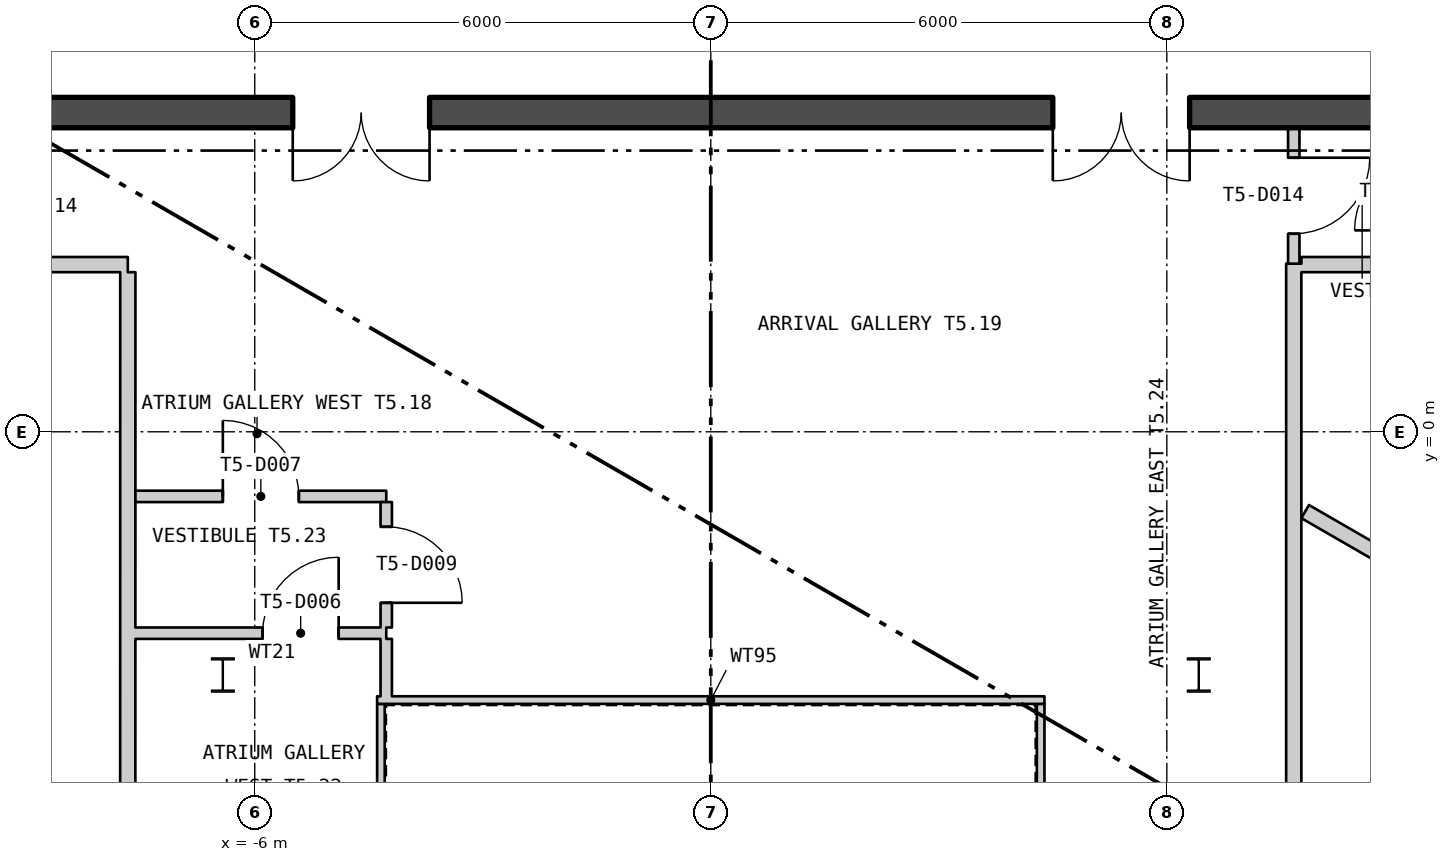
"""IFC4 building model, lengths in metres.
Left out: names, types, materials, properties, quantities, classifications, styles, units other than length and angle.
Written with IfcOpenShell. Run it as: python <this file> out.ifc"""

import sys

from ifc_helpers import new_model, si_unit, direction, frame, frame_2d, origin, origin_2d, place, context, subcontext, project, spatial, polyline, rectangle, i_section, outline, extrude, element, fill, save


model = new_model("IFC4")
c1 = context("Model", 3, precision=1e-05, world=origin(), true_north=direction((0.0, 1.0)))
c2 = subcontext(c1, "Body", "Model", "MODEL_VIEW")
j1 = project(units=[si_unit("LENGTHUNIT", "METRE"), si_unit("PLANEANGLEUNIT", "RADIAN")], contexts=[c1])
p1 = place(None, origin())
s1 = spatial("IfcSite", under=j1, at=p1, CompositionType="ELEMENT")
p2 = place(p1, origin())
s2 = spatial("IfcBuilding", under=s1, at=p2, CompositionType="ELEMENT")
p3 = place(p2, frame((0.0, 0.0, 292.2)))
s3 = spatial("IfcBuildingStorey", under=s2, at=p3, CompositionType="ELEMENT", Elevation=292.2)
for number, where, z_axis, x_axis in (
    (1, (6.42, -3.2, 0.0), (0.0, 0.0, 1.0), (1.0, 0.0, 0.0)),
    (2, (-6.42, -3.2, 0.0), (0.0, 0.0, 1.0), (1.0, 0.0, 0.0)),
):
    element("IfcColumn", number, at=place(p3, frame(where, z_axis=z_axis, x_axis=x_axis)), inside=s3, PredefinedType="COLUMN", context=c2, shape_type="SweptSolid", body=[
        extrude(i_section(OverallWidth=0.3, OverallDepth=0.45, WebThickness=0.014, FlangeThickness=0.026, at=origin_2d()), origin(), (0.0, 0.0, 1.0), 6.0),
    ])
p4 = place(p3, frame((-25.28, 15.792, -0.18), z_axis=(0.0, 0.0, 1.0), x_axis=(0.500000141277, -0.866025322218, 0.0)))
e3 = element("IfcWall", 3, at=p4, inside=s3, PredefinedType="SOLIDWALL", context=c2, shape_type="SweptSolid", body=[
    extrude(outline(polyline([(-0.13, -0.225), (45.86, -0.225), (45.6, 0.225), (0.13, 0.225), (-0.13, -0.225)])), origin(), (0.0, 0.0, 1.0), 5.9),
])
p5 = place(p4, frame((1.424, 0.0, 1.38)))
e4 = element("IfcOpeningElement", 4, at=p5, cuts=e3, PredefinedType="OPENING", context=c2, shape_type="SweptSolid", body=[
    extrude(rectangle(XDim=2.4, YDim=3.6, at=frame_2d((1.2, 1.8))), frame((0.0, 0.235, 0.0), z_axis=(0.0, -1.0, 0.0), x_axis=(1.0, 0.0, 0.0)), (0.0, 0.0, 1.0), 0.47),
])
p6 = place(p4, frame((5.892, 0.0, 1.38)))
e5 = element("IfcOpeningElement", 5, at=p6, cuts=e3, PredefinedType="OPENING", context=c2, shape_type="SweptSolid", body=[
    extrude(rectangle(XDim=2.4, YDim=3.6, at=frame_2d((1.2, 1.8))), frame((0.0, 0.235, 0.0), z_axis=(0.0, -1.0, 0.0), x_axis=(1.0, 0.0, 0.0)), (0.0, 0.0, 1.0), 0.47),
])
p7 = place(p4, frame((10.399, 0.0, 1.38)))
e6 = element("IfcOpeningElement", 6, at=p7, cuts=e3, PredefinedType="OPENING", context=c2, shape_type="SweptSolid", body=[
    extrude(rectangle(XDim=2.4, YDim=3.6, at=frame_2d((1.2, 1.8))), frame((0.0, 0.235, 0.0), z_axis=(0.0, -1.0, 0.0), x_axis=(1.0, 0.0, 0.0)), (0.0, 0.0, 1.0), 0.47),
])
p8 = place(p4, frame((14.905, 0.0, 1.38)))
e7 = element("IfcOpeningElement", 7, at=p8, cuts=e3, PredefinedType="OPENING", context=c2, shape_type="SweptSolid", body=[
    extrude(rectangle(XDim=2.4, YDim=3.6, at=frame_2d((1.2, 1.8))), frame((0.0, 0.235, 0.0), z_axis=(0.0, -1.0, 0.0), x_axis=(1.0, 0.0, 0.0)), (0.0, 0.0, 1.0), 0.47),
])
p9 = place(p4, frame((19.412, 0.0, 1.38)))
e8 = element("IfcOpeningElement", 8, at=p9, cuts=e3, PredefinedType="OPENING", context=c2, shape_type="SweptSolid", body=[
    extrude(rectangle(XDim=2.4, YDim=3.6, at=frame_2d((1.2, 1.8))), frame((0.0, 0.235, 0.0), z_axis=(0.0, -1.0, 0.0), x_axis=(1.0, 0.0, 0.0)), (0.0, 0.0, 1.0), 0.47),
])
p10 = place(p4, frame((23.918, 0.0, 1.38)))
e9 = element("IfcOpeningElement", 9, at=p10, cuts=e3, PredefinedType="OPENING", context=c2, shape_type="SweptSolid", body=[
    extrude(rectangle(XDim=2.4, YDim=3.6, at=frame_2d((1.2, 1.8))), frame((0.0, 0.235, 0.0), z_axis=(0.0, -1.0, 0.0), x_axis=(1.0, 0.0, 0.0)), (0.0, 0.0, 1.0), 0.47),
])
p11 = place(p4, frame((28.425, 0.0, 1.38)))
e10 = element("IfcOpeningElement", 10, at=p11, cuts=e3, PredefinedType="OPENING", context=c2, shape_type="SweptSolid", body=[
    extrude(rectangle(XDim=2.4, YDim=3.6, at=frame_2d((1.2, 1.8))), frame((0.0, 0.235, 0.0), z_axis=(0.0, -1.0, 0.0), x_axis=(1.0, 0.0, 0.0)), (0.0, 0.0, 1.0), 0.47),
])
p12 = place(p4, frame((32.932, 0.0, 1.38)))
e11 = element("IfcOpeningElement", 11, at=p12, cuts=e3, PredefinedType="OPENING", context=c2, shape_type="SweptSolid", body=[
    extrude(rectangle(XDim=2.4, YDim=3.6, at=frame_2d((1.2, 1.8))), frame((0.0, 0.235, 0.0), z_axis=(0.0, -1.0, 0.0), x_axis=(1.0, 0.0, 0.0)), (0.0, 0.0, 1.0), 0.47),
])
p13 = place(p4, frame((37.438, 0.0, 1.38)))
e12 = element("IfcOpeningElement", 12, at=p13, cuts=e3, PredefinedType="OPENING", context=c2, shape_type="SweptSolid", body=[
    extrude(rectangle(XDim=2.4, YDim=3.6, at=frame_2d((1.2, 1.8))), frame((0.0, 0.235, 0.0), z_axis=(0.0, -1.0, 0.0), x_axis=(1.0, 0.0, 0.0)), (0.0, 0.0, 1.0), 0.47),
])
p14 = place(p4, frame((41.907, 0.0, 1.38)))
e13 = element("IfcOpeningElement", 13, at=p14, cuts=e3, PredefinedType="OPENING", context=c2, shape_type="SweptSolid", body=[
    extrude(rectangle(XDim=2.4, YDim=3.6, at=frame_2d((1.2, 1.8))), frame((0.0, 0.235, 0.0), z_axis=(0.0, -1.0, 0.0), x_axis=(1.0, 0.0, 0.0)), (0.0, 0.0, 1.0), 0.47),
])
p15 = place(p3, frame((4.34, -11.62, 0.0), z_axis=(0.0, 0.0, 1.0), x_axis=(0.0, 1.0, 0.0)))
e14 = element("IfcWall", 14, at=p15, inside=s3, PredefinedType="PARTITIONING", context=c2, shape_type="SweptSolid", body=[
    extrude(rectangle(XDim=8.04, YDim=0.1, at=frame_2d((4.02, 0.0))), origin(), (0.0, 0.0, 1.0), 5.7),
])
p16 = place(p3, frame((4.39, -3.53, 0.0), z_axis=(0.0, 0.0, 1.0), x_axis=(-1.0, 0.0, 0.0)))
e15 = element("IfcWall", 15, at=p16, inside=s3, PredefinedType="PARTITIONING", context=c2, shape_type="SweptSolid", body=[
    extrude(rectangle(XDim=8.78, YDim=0.1, at=frame_2d((4.39, 0.0))), origin(), (0.0, 0.0, 1.0), 5.7),
])
p17 = place(p3, frame((-4.34, -3.58, 0.0), z_axis=(0.0, 0.0, 1.0), x_axis=(0.0, -1.0, 0.0)))
e16 = element("IfcWall", 16, at=p17, inside=s3, PredefinedType="PARTITIONING", context=c2, shape_type="SweptSolid", body=[
    extrude(rectangle(XDim=8.04, YDim=0.1, at=frame_2d((4.02, 0.0))), origin(), (0.0, 0.0, 1.0), 5.7),
])
p18 = place(p3, frame((-14.5, 4.2, 0.0), z_axis=(0.0, 0.0, 1.0), x_axis=(1.0, 0.0, 0.0)))
e17 = element("IfcWall", 17, at=p18, inside=s3, PredefinedType="SHEAR", context=c2, shape_type="SweptSolid", body=[
    extrude(rectangle(XDim=29.0, YDim=0.4, at=frame_2d((14.5, 0.0))), origin(), (0.0, 0.0, 1.0), 5.7),
])
p19 = place(p18, frame((9.0, 0.0, 0.0)))
e18 = element("IfcOpeningElement", 18, at=p19, cuts=e17, PredefinedType="OPENING", context=c2, shape_type="SweptSolid", body=[
    extrude(rectangle(XDim=1.8, YDim=2.4, at=frame_2d((0.9, 1.2))), frame((0.0, 0.21, 0.0), z_axis=(0.0, -1.0, 0.0), x_axis=(1.0, 0.0, 0.0)), (0.0, 0.0, 1.0), 0.42),
])
p20 = place(p18, frame((19.0, 0.0, 0.0)))
e19 = element("IfcOpeningElement", 19, at=p20, cuts=e17, PredefinedType="OPENING", context=c2, shape_type="SweptSolid", body=[
    extrude(rectangle(XDim=1.8, YDim=2.4, at=frame_2d((0.9, 1.2))), frame((0.0, 0.21, 0.0), z_axis=(0.0, -1.0, 0.0), x_axis=(1.0, 0.0, 0.0)), (0.0, 0.0, 1.0), 0.42),
])
p21 = place(p3, frame((-16.4, 2.2, 0.0), z_axis=(0.0, 0.0, 1.0), x_axis=(1.0, 0.0, 0.0)))
e20 = element("IfcWall", 20, at=p21, inside=s3, PredefinedType="PARTITIONING", context=c2, shape_type="SweptSolid", body=[
    extrude(rectangle(XDim=8.73, YDim=0.2, at=frame_2d((4.365, 0.0))), origin(), (0.0, 0.0, 1.0), 5.7),
])
p22 = place(p21, frame((4.657, 0.0, 0.0)))
e21 = element("IfcOpeningElement", 21, at=p22, cuts=e20, PredefinedType="OPENING", context=c2, shape_type="SweptSolid", body=[
    extrude(rectangle(XDim=1.1, YDim=2.1, at=frame_2d((0.55, 1.05))), frame((0.0, 0.11, 0.0), z_axis=(0.0, -1.0, 0.0), x_axis=(1.0, 0.0, 0.0)), (0.0, 0.0, 1.0), 0.22),
])
p23 = place(p3, frame((-7.671, -5.65, 0.0), z_axis=(0.0, 0.0, 1.0), x_axis=(0.000129032257, 0.999999991675, 0.0)))
e22 = element("IfcWall", 22, at=p23, inside=s3, PredefinedType="PARTITIONING", context=c2, shape_type="SweptSolid", body=[
    extrude(rectangle(XDim=7.75, YDim=0.2, at=frame_2d((3.875, 0.0))), origin(), (0.0, 0.0, 1.0), 5.7),
])
p24 = place(p3, frame((-7.571, -2.65, 0.0), z_axis=(0.0, 0.0, 1.0), x_axis=(1.0, 0.0, 0.0)))
e23 = element("IfcWall", 23, at=p24, inside=s3, PredefinedType="PARTITIONING", context=c2, shape_type="SweptSolid", body=[
    extrude(rectangle(XDim=3.301, YDim=0.15, at=frame_2d((1.651, 0.0))), origin(), (0.0, 0.0, 1.0), 5.7),
])
p25 = place(p24, frame((1.675, 0.0, 0.0)))
e24 = element("IfcOpeningElement", 24, at=p25, cuts=e23, PredefinedType="OPENING", context=c2, shape_type="SweptSolid", body=[
    extrude(rectangle(XDim=1.0, YDim=2.1, at=frame_2d((0.5, 1.05))), frame((0.0, 0.085, 0.0), z_axis=(0.0, -1.0, 0.0), x_axis=(1.0, 0.0, 0.0)), (0.0, 0.0, 1.0), 0.17),
])
p26 = place(p3, frame((-7.57, -0.85, 0.0), z_axis=(0.0, 0.0, 1.0), x_axis=(1.0, 0.0, 0.0)))
e25 = element("IfcWall", 25, at=p26, inside=s3, PredefinedType="PARTITIONING", context=c2, shape_type="SweptSolid", body=[
    extrude(rectangle(XDim=3.3, YDim=0.15, at=frame_2d((1.65, 0.0))), origin(), (0.0, 0.0, 1.0), 5.7),
])
p27 = place(p26, frame((1.15, 0.0, 0.0)))
e26 = element("IfcOpeningElement", 26, at=p27, cuts=e25, PredefinedType="OPENING", context=c2, shape_type="SweptSolid", body=[
    extrude(rectangle(XDim=1.0, YDim=2.1, at=frame_2d((0.5, 1.05))), frame((0.0, 0.085, 0.0), z_axis=(0.0, -1.0, 0.0), x_axis=(1.0, 0.0, 0.0)), (0.0, 0.0, 1.0), 0.17),
])
p28 = place(p3, frame((-4.27, -3.48, 0.0), z_axis=(0.0, 0.0, 1.0), x_axis=(0.0, 1.0, 0.0)))
e27 = element("IfcWall", 27, at=p28, inside=s3, PredefinedType="PARTITIONING", context=c2, shape_type="SweptSolid", body=[
    extrude(rectangle(XDim=0.755, YDim=0.15, at=frame_2d((0.378, 0.0))), origin(), (0.0, 0.0, 1.0), 5.7),
])
p29 = place(p3, frame((-4.27, -2.575, 0.0), z_axis=(0.0, 0.0, 1.0), x_axis=(0.0, 1.0, 0.0)))
e28 = element("IfcWall", 28, at=p29, inside=s3, PredefinedType="PARTITIONING", context=c2, shape_type="SweptSolid", body=[
    extrude(rectangle(XDim=1.65, YDim=0.15, at=frame_2d((0.825, 0.0))), origin(), (0.0, 0.0, 1.0), 5.7),
])
p30 = place(p29, frame((0.325, 0.0, 0.0)))
e29 = element("IfcOpeningElement", 29, at=p30, cuts=e28, PredefinedType="OPENING", context=c2, shape_type="SweptSolid", body=[
    extrude(rectangle(XDim=1.0, YDim=2.1, at=frame_2d((0.5, 1.05))), frame((0.0, 0.085, 0.0), z_axis=(0.0, -1.0, 0.0), x_axis=(1.0, 0.0, 0.0)), (0.0, 0.0, 1.0), 0.17),
])
p31 = place(p3, frame((7.67, -13.7, 0.0), z_axis=(0.0, 0.0, 1.0), x_axis=(0.0, 1.0, 0.0)))
e30 = element("IfcWall", 30, at=p31, inside=s3, PredefinedType="PARTITIONING", context=c2, shape_type="SweptSolid", body=[
    extrude(rectangle(XDim=15.912, YDim=0.2, at=frame_2d((7.956, 0.0))), origin(), (0.0, 0.0, 1.0), 5.7),
])
p32 = place(p31, frame((5.342, 0.0, 0.0)))
e31 = element("IfcOpeningElement", 31, at=p32, cuts=e30, PredefinedType="OPENING", context=c2, shape_type="SweptSolid", body=[
    extrude(rectangle(XDim=1.1, YDim=2.1, at=frame_2d((0.55, 1.05))), frame((0.0, 0.11, 0.0), z_axis=(0.0, -1.0, 0.0), x_axis=(1.0, 0.0, 0.0)), (0.0, 0.0, 1.0), 0.22),
])
p33 = place(p3, frame((7.67, 2.212, 0.0), z_axis=(0.0, 0.0, 1.0), x_axis=(0.0, 1.0, 0.0)))
e32 = element("IfcWall", 32, at=p33, inside=s3, PredefinedType="PARTITIONING", context=c2, shape_type="SweptSolid", body=[
    extrude(rectangle(XDim=1.788, YDim=0.15, at=frame_2d((0.894, 0.0))), origin(), (0.0, 0.0, 1.0), 5.7),
])
p34 = place(p33, frame((0.394, 0.0, 0.0)))
e33 = element("IfcOpeningElement", 33, at=p34, cuts=e32, PredefinedType="OPENING", context=c2, shape_type="SweptSolid", body=[
    extrude(rectangle(XDim=1.0, YDim=2.1, at=frame_2d((0.5, 1.05))), frame((0.0, 0.085, 0.0), z_axis=(0.0, -1.0, 0.0), x_axis=(1.0, 0.0, 0.0)), (0.0, 0.0, 1.0), 0.17),
])
p35 = place(p3, frame((7.77, 2.2, 0.0), z_axis=(0.0, 0.0, 1.0), x_axis=(1.0, 0.0, 0.0)))
e34 = element("IfcWall", 34, at=p35, inside=s3, PredefinedType="PARTITIONING", context=c2, shape_type="SweptSolid", body=[
    extrude(rectangle(XDim=8.63, YDim=0.2, at=frame_2d((4.315, 0.0))), origin(), (0.0, 0.0, 1.0), 5.7),
])
p36 = place(p35, frame((3.59, 0.0, 0.0)))
e35 = element("IfcOpeningElement", 35, at=p36, cuts=e34, PredefinedType="OPENING", context=c2, shape_type="SweptSolid", body=[
    extrude(rectangle(XDim=1.1, YDim=2.1, at=frame_2d((0.55, 1.05))), frame((0.0, 0.11, 0.0), z_axis=(0.0, -1.0, 0.0), x_axis=(1.0, 0.0, 0.0)), (0.0, 0.0, 1.0), 0.22),
])
p37 = place(p3, frame((7.82, -1.05, 0.0), z_axis=(0.0, 0.0, 1.0), x_axis=(0.866069507536, -0.49992360228, 0.0)))
e36 = element("IfcWall", 36, at=p37, inside=s3, PredefinedType="PARTITIONING", context=c2, shape_type="SweptSolid", body=[
    extrude(rectangle(XDim=6.025, YDim=0.2, at=frame_2d((3.012, 0.0))), origin(), (0.0, 0.0, 1.0), 5.7),
])
p38 = place(p19, origin())
e37 = element("IfcDoor", 37, at=p38, inside=s3, OperationType="DOUBLE_DOOR_SINGLE_SWING", PredefinedType="DOOR", context=c2, shape_type="SweptSolid", body=[
    extrude(rectangle(XDim=1.8, YDim=2.4, at=frame_2d((0.9, 1.2))), frame((0.0, 0.025, 0.0), z_axis=(0.0, -1.0, 0.0), x_axis=(1.0, 0.0, 0.0)), (0.0, 0.0, 1.0), 0.05),
])
fill(e18, e37)
p39 = place(p20, origin())
e38 = element("IfcDoor", 38, at=p39, inside=s3, OperationType="DOUBLE_DOOR_SINGLE_SWING", PredefinedType="DOOR", context=c2, shape_type="SweptSolid", body=[
    extrude(rectangle(XDim=1.8, YDim=2.4, at=frame_2d((0.9, 1.2))), frame((0.0, 0.025, 0.0), z_axis=(0.0, -1.0, 0.0), x_axis=(1.0, 0.0, 0.0)), (0.0, 0.0, 1.0), 0.05),
])
fill(e19, e38)
p40 = place(p25, origin())
e39 = element("IfcDoor", 39, at=p40, inside=s3, OperationType="SINGLE_SWING_LEFT", PredefinedType="DOOR", context=c2, shape_type="SweptSolid", body=[
    extrude(rectangle(XDim=1.0, YDim=2.1, at=frame_2d((0.5, 1.05))), frame((0.0, 0.025, 0.0), z_axis=(0.0, -1.0, 0.0), x_axis=(1.0, 0.0, 0.0)), (0.0, 0.0, 1.0), 0.05),
])
fill(e24, e39)
p41 = place(p27, origin())
e40 = element("IfcDoor", 40, at=p41, inside=s3, OperationType="SINGLE_SWING_RIGHT", PredefinedType="DOOR", context=c2, shape_type="SweptSolid", body=[
    extrude(rectangle(XDim=1.0, YDim=2.1, at=frame_2d((0.5, 1.05))), frame((0.0, 0.025, 0.0), z_axis=(0.0, -1.0, 0.0), x_axis=(1.0, 0.0, 0.0)), (0.0, 0.0, 1.0), 0.05),
])
fill(e26, e40)
p42 = place(p30, origin())
e41 = element("IfcDoor", 41, at=p42, inside=s3, OperationType="SINGLE_SWING_LEFT", PredefinedType="DOOR", context=c2, shape_type="SweptSolid", body=[
    extrude(rectangle(XDim=1.0, YDim=2.1, at=frame_2d((0.5, 1.05))), frame((0.0, 0.025, 0.0), z_axis=(0.0, -1.0, 0.0), x_axis=(1.0, 0.0, 0.0)), (0.0, 0.0, 1.0), 0.05),
])
fill(e29, e41)
p43 = place(p34, origin())
e42 = element("IfcDoor", 42, at=p43, inside=s3, OperationType="SINGLE_SWING_RIGHT", PredefinedType="DOOR", context=c2, shape_type="SweptSolid", body=[
    extrude(rectangle(XDim=1.0, YDim=2.1, at=frame_2d((0.5, 1.05))), frame((0.0, 0.025, 0.0), z_axis=(0.0, -1.0, 0.0), x_axis=(1.0, 0.0, 0.0)), (0.0, 0.0, 1.0), 0.05),
])
fill(e33, e42)
save(model, sys.argv[1])
